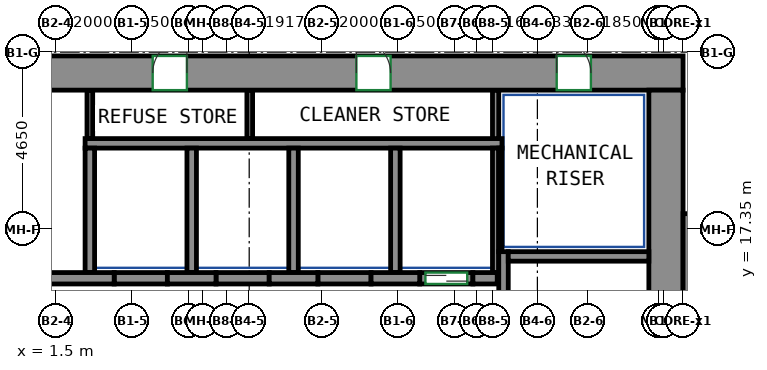
"""IFC4 building model, lengths in metres.
Left out: names, types, materials, properties, quantities, classifications, styles, units other than length and angle.
Written with IfcOpenShell. Run it as: python <this file> out.ifc"""

import sys

from ifc_helpers import new_model, si_unit, direction, frame, frame_2d, origin, place, context, subcontext, project, spatial, rectangle, extrude, source, transform, mapped, element, fill, save


model = new_model("IFC4")
c1 = context("Model", 3, precision=1e-05, world=origin(), true_north=direction((0.0, 1.0)))
c2 = subcontext(c1, "Body", "Model", "MODEL_VIEW")
j1 = project(units=[si_unit("LENGTHUNIT", "METRE"), si_unit("PLANEANGLEUNIT", "RADIAN")], contexts=[c1])
p1 = place(None, origin())
s1 = spatial("IfcSite", under=j1, at=p1, CompositionType="ELEMENT")
p2 = place(p1, origin())
s2 = spatial("IfcBuilding", under=s1, at=p2, CompositionType="ELEMENT")
p3 = place(p2, frame((0.0, 0.0, 147.3)))
s3 = spatial("IfcBuildingStorey", under=s2, at=p3, CompositionType="ELEMENT", Elevation=147.3)
m1 = source(origin(), c2, "Body", "SweptSolid", [
    extrude(rectangle(XDim=33.9, YDim=0.9, at=frame_2d((16.95, 0.0))), origin(), (0.0, 0.0, 1.0), 3.12),
])
p4 = place(p3, frame((-15.9, 21.45, 0.0), z_axis=(0.0, 0.0, 1.0), x_axis=(1.0, 0.0, 0.0)))
e1 = element("IfcWall", 1, at=p4, inside=s3, PredefinedType="SHEAR", context=c2, shape_type="MappedRepresentation", body=[
    mapped(m1, transform((0.0, 0.0, 0.0))),
])
p5 = place(p4, frame((8.42, 0.0, 0.0)))
e2 = element("IfcOpeningElement", 2, at=p5, cuts=e1, PredefinedType="OPENING", context=c2, shape_type="SweptSolid", body=[
    extrude(rectangle(XDim=0.9, YDim=2.1, at=frame_2d((0.45, 1.05))), frame((0.0, 0.46, 0.0), z_axis=(0.0, -1.0, 0.0), x_axis=(1.0, 0.0, 0.0)), (0.0, 0.0, 1.0), 0.92),
])
p6 = place(p4, frame((15.12, 0.0, 0.0)))
e3 = element("IfcOpeningElement", 3, at=p6, cuts=e1, PredefinedType="OPENING", context=c2, shape_type="SweptSolid", body=[
    extrude(rectangle(XDim=0.9, YDim=2.1, at=frame_2d((0.45, 1.05))), frame((0.0, 0.46, 0.0), z_axis=(0.0, -1.0, 0.0), x_axis=(1.0, 0.0, 0.0)), (0.0, 0.0, 1.0), 0.92),
])
p7 = place(p4, frame((19.944, 0.0, 0.0)))
e4 = element("IfcOpeningElement", 4, at=p7, cuts=e1, PredefinedType="OPENING", context=c2, shape_type="SweptSolid", body=[
    extrude(rectangle(XDim=0.9, YDim=2.1, at=frame_2d((0.45, 1.05))), frame((0.0, 0.46, 0.0), z_axis=(0.0, -1.0, 0.0), x_axis=(1.0, 0.0, 0.0)), (0.0, 0.0, 1.0), 0.92),
])
p8 = place(p4, frame((25.304, 0.0, 0.0)))
e5 = element("IfcOpeningElement", 5, at=p8, cuts=e1, PredefinedType="OPENING", context=c2, shape_type="SweptSolid", body=[
    extrude(rectangle(XDim=0.9, YDim=2.1, at=frame_2d((0.45, 1.05))), frame((0.0, 0.46, 0.0), z_axis=(0.0, -1.0, 0.0), x_axis=(1.0, 0.0, 0.0)), (0.0, 0.0, 1.0), 0.92),
])
p9 = place(p4, frame((2.425, 0.0, 0.0)))
e6 = element("IfcOpeningElement", 6, at=p9, cuts=e1, PredefinedType="OPENING", context=c2, shape_type="SweptSolid", body=[
    extrude(rectangle(XDim=0.9, YDim=2.1, at=frame_2d((0.45, 1.05))), frame((0.0, 0.46, 0.0), z_axis=(0.0, -1.0, 0.0), x_axis=(1.0, 0.0, 0.0)), (0.0, 0.0, 1.0), 0.92),
])
p10 = place(p4, frame((30.575, 0.0, 0.0)))
e7 = element("IfcOpeningElement", 7, at=p10, cuts=e1, PredefinedType="OPENING", context=c2, shape_type="SweptSolid", body=[
    extrude(rectangle(XDim=0.9, YDim=2.1, at=frame_2d((0.45, 1.05))), frame((0.0, 0.46, 0.0), z_axis=(0.0, -1.0, 0.0), x_axis=(1.0, 0.0, 0.0)), (0.0, 0.0, 1.0), 0.92),
])
m2 = source(origin(), c2, "Body", "SweptSolid", [
    extrude(rectangle(XDim=12.0, YDim=0.9, at=frame_2d((6.0, 0.0))), origin(), (0.0, 0.0, 1.0), 3.12),
])
p11 = place(p3, frame((17.55, 9.0, 0.0), z_axis=(0.0, 0.0, 1.0), x_axis=(0.0, 1.0, 0.0)))
e8 = element("IfcWall", 8, at=p11, inside=s3, PredefinedType="SHEAR", context=c2, shape_type="MappedRepresentation", body=[
    mapped(m2, transform((0.0, 0.0, 0.0))),
])
m3 = source(origin(), c2, "Body", "SweptSolid", [
    extrude(rectangle(XDim=7.75, YDim=0.25, at=frame_2d((3.875, 0.0))), origin(), (0.0, 0.0, 1.0), 3.12),
])
p12 = place(p3, frame((13.275, 9.0, 0.0), z_axis=(0.0, 0.0, 1.0), x_axis=(0.0, 1.0, 0.0)))
e9 = element("IfcWall", 9, at=p12, inside=s3, PredefinedType="SHEAR", context=c2, shape_type="MappedRepresentation", body=[
    mapped(m3, transform((0.0, 0.0, 0.0))),
])
m4 = source(origin(), c2, "Body", "SweptSolid", [
    extrude(rectangle(XDim=3.7, YDim=0.25, at=frame_2d((1.85, 0.0))), origin(), (0.0, 0.0, 1.0), 3.12),
])
p13 = place(p3, frame((13.4, 16.625, 0.0), z_axis=(0.0, 0.0, 1.0), x_axis=(1.0, 0.0, 0.0)))
e10 = element("IfcWall", 10, at=p13, inside=s3, PredefinedType="SHEAR", context=c2, shape_type="MappedRepresentation", body=[
    mapped(m4, transform((0.0, 0.0, 0.0))),
])
m5 = source(origin(), c2, "Body", "SweptSolid", [
    extrude(rectangle(XDim=8.0, YDim=0.35, at=frame_2d((4.0, 0.0))), origin(), (0.0, 0.0, 1.0), 3.12),
])
p14 = place(p3, frame((18.175, 9.75, 0.0), z_axis=(0.0, 0.0, 1.0), x_axis=(0.0, 1.0, 0.0)))
e11 = element("IfcWall", 11, at=p14, inside=s3, PredefinedType="SHEAR", context=c2, shape_type="MappedRepresentation", body=[
    mapped(m5, transform((0.0, 0.0, 0.0))),
])
m6 = source(origin(), c2, "Body", "SweptSolid", [
    extrude(rectangle(XDim=14.04, YDim=0.3, at=frame_2d((7.02, 0.0))), origin(), (0.0, 0.0, 1.0), 3.12),
])
p15 = place(p3, frame((-11.01, 16.05, 0.0), z_axis=(0.0, 0.0, 1.0), x_axis=(1.0, 0.0, 0.0)))
e12 = element("IfcWall", 12, at=p15, inside=s3, PredefinedType="SHEAR", context=c2, shape_type="MappedRepresentation", body=[
    mapped(m6, transform((0.0, 0.0, 0.0))),
])
m7 = source(origin(), c2, "Body", "SweptSolid", [
    extrude(rectangle(XDim=1.28, YDim=0.3, at=frame_2d((0.64, 0.0))), origin(), (0.0, 0.0, 1.0), 3.12),
])
p16 = place(p3, frame((4.43, 16.05, 0.0), z_axis=(0.0, 0.0, 1.0), x_axis=(1.0, 0.0, 0.0)))
e13 = element("IfcWall", 13, at=p16, inside=s3, PredefinedType="SHEAR", context=c2, shape_type="MappedRepresentation", body=[
    mapped(m7, transform((0.0, 0.0, 0.0))),
])
m8 = source(origin(), c2, "Body", "SweptSolid", [
    extrude(rectangle(XDim=1.28, YDim=0.3, at=frame_2d((0.64, 0.0))), origin(), (0.0, 0.0, 1.0), 3.12),
])
p17 = place(p3, frame((7.11, 16.05, 0.0), z_axis=(0.0, 0.0, 1.0), x_axis=(1.0, 0.0, 0.0)))
e14 = element("IfcWall", 14, at=p17, inside=s3, PredefinedType="SHEAR", context=c2, shape_type="MappedRepresentation", body=[
    mapped(m8, transform((0.0, 0.0, 0.0))),
])
p18 = place(p3, frame((9.79, 16.05, 0.0), z_axis=(0.0, 0.0, 1.0), x_axis=(1.0, 0.0, 0.0)))
e15 = element("IfcWall", 15, at=p18, inside=s3, PredefinedType="SHEAR", context=c2, shape_type="MappedRepresentation", body=[
    mapped(m7, transform((0.0, 0.0, 0.0))),
])
m9 = source(origin(), c2, "Body", "SweptSolid", [
    extrude(rectangle(XDim=0.64, YDim=0.3, at=frame_2d((0.32, 0.0))), origin(), (0.0, 0.0, 1.0), 3.12),
])
p19 = place(p3, frame((12.47, 16.05, 0.0), z_axis=(0.0, 0.0, 1.0), x_axis=(1.0, 0.0, 0.0)))
e16 = element("IfcWall", 16, at=p19, inside=s3, PredefinedType="SHEAR", context=c2, shape_type="MappedRepresentation", body=[
    mapped(m9, transform((0.0, 0.0, 0.0))),
])
m10 = source(origin(), c2, "Body", "SweptSolid", [
    extrude(rectangle(XDim=1.4, YDim=0.3, at=frame_2d((0.7, 0.0))), origin(), (0.0, 0.0, 1.0), 3.12),
])
p20 = place(p3, frame((11.07, 16.05, 0.0), z_axis=(0.0, 0.0, 1.0), x_axis=(1.0, 0.0, 0.0)))
e17 = element("IfcWall", 17, at=p20, inside=s3, PredefinedType="PARTITIONING", context=c2, shape_type="MappedRepresentation", body=[
    mapped(m10, transform((0.0, 0.0, 0.0))),
])
p21 = place(p20, frame((0.15, 0.0, 0.0)))
e18 = element("IfcOpeningElement", 18, at=p21, cuts=e17, PredefinedType="OPENING", context=c2, shape_type="SweptSolid", body=[
    extrude(rectangle(XDim=1.1, YDim=2.1, at=frame_2d((0.55, 1.05))), frame((0.0, 0.16, 0.0), z_axis=(0.0, -1.0, 0.0), x_axis=(1.0, 0.0, 0.0)), (0.0, 0.0, 1.0), 0.32),
])
p22 = place(p3, frame((3.03, 16.05, 0.0), z_axis=(0.0, 0.0, 1.0), x_axis=(1.0, 0.0, 0.0)))
e19 = element("IfcWall", 19, at=p22, inside=s3, PredefinedType="PARTITIONING", context=c2, shape_type="MappedRepresentation", body=[
    mapped(m10, transform((0.0, 0.0, 0.0))),
])
m11 = source(origin(), c2, "Body", "SweptSolid", [
    extrude(rectangle(XDim=1.4, YDim=0.3, at=frame_2d((0.7, 0.0))), origin(), (0.0, 0.0, 1.0), 3.12),
])
for number, where, z_axis, x_axis in (
    (20, (5.71, 16.05, 0.0), (0.0, 0.0, 1.0), (1.0, 0.0, 0.0)),
    (21, (8.39, 16.05, 0.0), (0.0, 0.0, 1.0), (1.0, 0.0, 0.0)),
):
    element("IfcWall", number, at=place(p3, frame(where, z_axis=z_axis, x_axis=x_axis)), inside=s3, PredefinedType="PARTITIONING", context=c2, shape_type="MappedRepresentation", body=[
        mapped(m11, transform((0.0, 0.0, 0.0))),
    ])
m12 = source(origin(), c2, "Body", "SweptSolid", [
    extrude(rectangle(XDim=10.97, YDim=0.25, at=frame_2d((5.485, 0.0))), origin(), (0.0, 0.0, 1.0), 3.12),
])
p23 = place(p3, frame((2.265, 19.6, 0.0), z_axis=(0.0, 0.0, 1.0), x_axis=(1.0, 0.0, 0.0)))
e22 = element("IfcWall", 22, at=p23, inside=s3, PredefinedType="PARTITIONING", context=c2, shape_type="MappedRepresentation", body=[
    mapped(m12, transform((0.0, 0.0, 0.0))),
])
m13 = source(origin(), c2, "Body", "SweptSolid", [
    extrude(rectangle(XDim=3.275, YDim=0.165, at=frame_2d((1.638, 0.0))), origin(), (0.0, 0.0, 1.0), 3.12),
])
p24 = place(p3, frame((13.067, 16.2, 0.0), z_axis=(0.0, 0.0, 1.0), x_axis=(0.0, 1.0, 0.0)))
e23 = element("IfcWall", 23, at=p24, inside=s3, PredefinedType="PARTITIONING", context=c2, shape_type="MappedRepresentation", body=[
    mapped(m13, transform((0.0, 0.0, 0.0))),
])
m14 = source(origin(), c2, "Body", "SweptSolid", [
    extrude(rectangle(XDim=1.275, YDim=0.165, at=frame_2d((0.637, 0.0))), origin(), (0.0, 0.0, 1.0), 3.12),
])
p25 = place(p3, frame((13.067, 19.725, 0.0), z_axis=(0.0, 0.0, 1.0), x_axis=(0.0, 1.0, 0.0)))
e24 = element("IfcWall", 24, at=p25, inside=s3, PredefinedType="PARTITIONING", context=c2, shape_type="MappedRepresentation", body=[
    mapped(m14, transform((0.0, 0.0, 0.0))),
])
m15 = source(origin(), c2, "Body", "SweptSolid", [
    extrude(rectangle(XDim=3.275, YDim=0.25, at=frame_2d((1.638, 0.0))), origin(), (0.0, 0.0, 1.0), 3.12),
])
p26 = place(p3, frame((10.43, 16.2, 0.0), z_axis=(0.0, 0.0, 1.0), x_axis=(0.0, 1.0, 0.0)))
e25 = element("IfcWall", 25, at=p26, inside=s3, PredefinedType="PARTITIONING", context=c2, shape_type="MappedRepresentation", body=[
    mapped(m15, transform((0.0, 0.0, 0.0))),
])
m16 = source(origin(), c2, "Body", "SweptSolid", [
    extrude(rectangle(XDim=2.725, YDim=0.085, at=frame_2d((1.363, 0.0))), origin(), (0.0, 0.0, 1.0), 3.12),
])
p27 = place(p3, frame((13.192, 16.75, 0.0), z_axis=(0.0, 0.0, 1.0), x_axis=(0.0, 1.0, 0.0)))
e26 = element("IfcWall", 26, at=p27, inside=s3, PredefinedType="PARTITIONING", context=c2, shape_type="MappedRepresentation", body=[
    mapped(m16, transform((0.0, 0.0, 0.0))),
])
for number, where, z_axis, x_axis in (
    (27, (2.39, 16.2, 0.0), (0.0, 0.0, 1.0), (0.0, 1.0, 0.0)),
    (28, (5.07, 16.2, 0.0), (0.0, 0.0, 1.0), (0.0, 1.0, 0.0)),
    (29, (7.75, 16.2, 0.0), (0.0, 0.0, 1.0), (0.0, 1.0, 0.0)),
):
    element("IfcWall", number, at=place(p3, frame(where, z_axis=z_axis, x_axis=x_axis)), inside=s3, PredefinedType="PARTITIONING", context=c2, shape_type="MappedRepresentation", body=[
        mapped(m15, transform((0.0, 0.0, 0.0))),
    ])
m17 = source(origin(), c2, "Body", "SweptSolid", [
    extrude(rectangle(XDim=1.275, YDim=0.15, at=frame_2d((0.637, 0.0))), origin(), (0.0, 0.0, 1.0), 3.12),
])
for number, where, z_axis, x_axis in (
    (30, (2.39, 19.725, 0.0), (0.0, 0.0, 1.0), (0.0, 1.0, 0.0)),
    (31, (6.598, 19.725, 0.0), (0.0, 0.0, 1.0), (0.0, 1.0, 0.0)),
):
    element("IfcWall", number, at=place(p3, frame(where, z_axis=z_axis, x_axis=x_axis)), inside=s3, PredefinedType="PARTITIONING", context=c2, shape_type="MappedRepresentation", body=[
        mapped(m17, transform((0.0, 0.0, 0.0))),
    ])
p28 = place(p21, origin())
e32 = element("IfcDoor", 32, at=p28, inside=s3, OperationType="DOUBLE_DOOR_SLIDING", PredefinedType="DOOR", context=c2, shape_type="SweptSolid", body=[
    extrude(rectangle(XDim=1.1, YDim=2.1, at=frame_2d((0.55, 1.05))), frame((0.0, 0.025, 0.0), z_axis=(0.0, -1.0, 0.0), x_axis=(1.0, 0.0, 0.0)), (0.0, 0.0, 1.0), 0.05),
])
fill(e18, e32)
p29 = place(p7, origin())
e33 = element("IfcDoor", 33, at=p29, inside=s3, OperationType="SINGLE_SWING_RIGHT", PredefinedType="DOOR", context=c2, shape_type="SweptSolid", body=[
    extrude(rectangle(XDim=0.9, YDim=2.1, at=frame_2d((0.45, 1.05))), frame((0.0, -0.305, 0.0), z_axis=(0.0, -1.0, 0.0), x_axis=(1.0, 0.0, 0.0)), (0.0, 0.0, 1.0), 0.05),
])
fill(e4, e33)
p30 = place(p8, origin())
e34 = element("IfcDoor", 34, at=p30, inside=s3, OperationType="SINGLE_SWING_LEFT", PredefinedType="DOOR", context=c2, shape_type="SweptSolid", body=[
    extrude(rectangle(XDim=0.9, YDim=2.1, at=frame_2d((0.45, 1.05))), frame((0.0, -0.305, 0.0), z_axis=(0.0, -1.0, 0.0), x_axis=(1.0, 0.0, 0.0)), (0.0, 0.0, 1.0), 0.05),
])
fill(e5, e34)
p31 = place(p10, origin())
e35 = element("IfcDoor", 35, at=p31, inside=s3, OperationType="SINGLE_SWING_LEFT", PredefinedType="DOOR", context=c2, shape_type="SweptSolid", body=[
    extrude(rectangle(XDim=0.9, YDim=2.1, at=frame_2d((0.45, 1.05))), frame((0.0, -0.305, 0.0), z_axis=(0.0, -1.0, 0.0), x_axis=(1.0, 0.0, 0.0)), (0.0, 0.0, 1.0), 0.05),
])
fill(e7, e35)
save(model, sys.argv[1])
